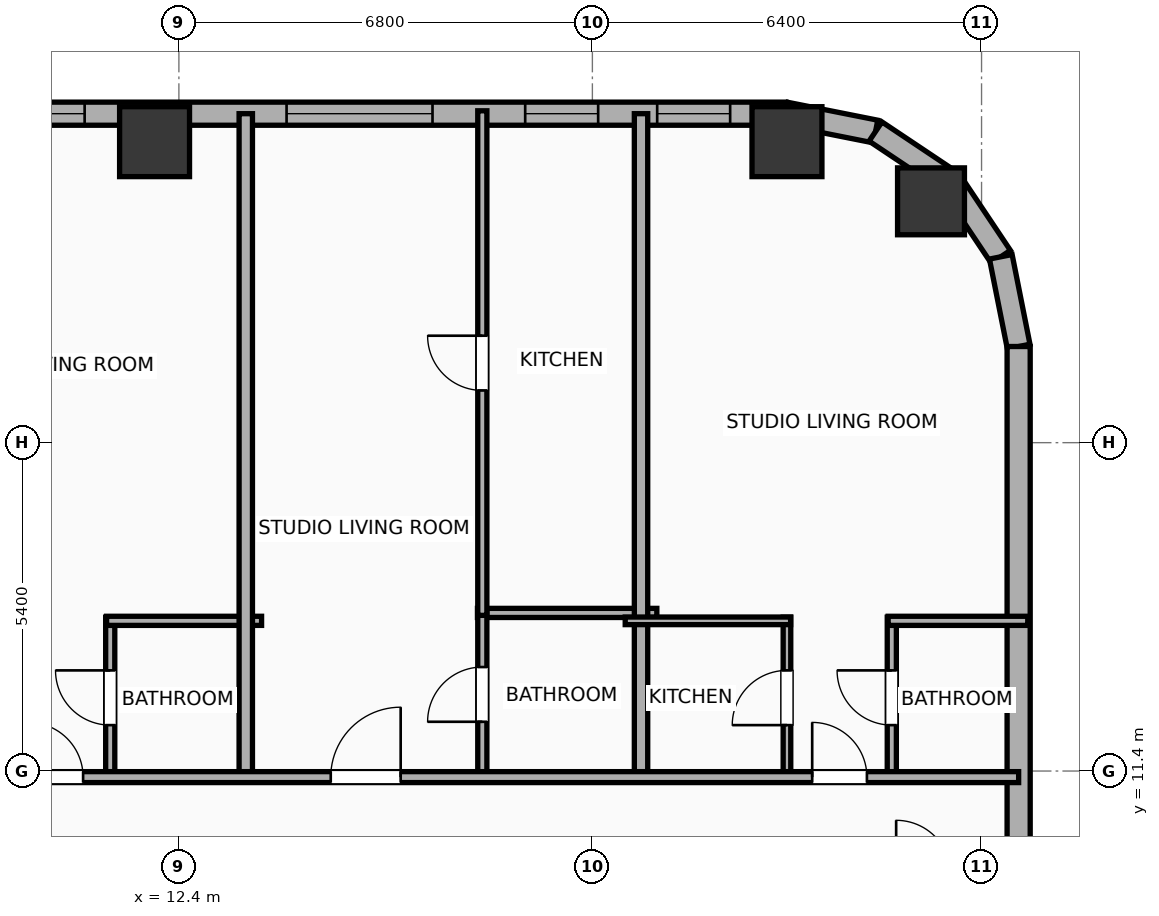
"""IFC4 building model, lengths in metres.
Left out: names, types, materials, properties, quantities, classifications, styles, units other than length and angle.
Written with IfcOpenShell. Run it as: python <this file> out.ifc"""

import sys

from ifc_helpers import new_model, si_unit, direction, frame, frame_2d, origin, origin_2d, place, context, subcontext, project, spatial, rectangle, hollow_rectangle, hollow_circle, extrude, element, fill, save


model = new_model("IFC4")
c1 = context("Model", 3, precision=1e-05, world=origin(), true_north=direction((0.0, 1.0)))
c2 = subcontext(c1, "Body", "Model", "MODEL_VIEW")
j1 = project(units=[si_unit("LENGTHUNIT", "METRE"), si_unit("PLANEANGLEUNIT", "RADIAN")], contexts=[c1])
p1 = place(None, origin())
s1 = spatial("IfcSite", under=j1, at=p1, CompositionType="ELEMENT")
p2 = place(p1, origin())
s2 = spatial("IfcBuilding", under=s1, at=p2, CompositionType="ELEMENT")
p3 = place(p2, frame((0.0, 0.0, 49.4)))
s3 = spatial("IfcBuildingStorey", under=s2, at=p3, CompositionType="ELEMENT", Elevation=49.4)
p4 = place(p3, frame((24.769, 20.769, 0.0), z_axis=(0.0, 0.0, 1.0), x_axis=(1.0, 0.0, 0.0)))
e1 = element("IfcColumn", 1, at=p4, inside=s3, PredefinedType="COLUMN", context=c2, shape_type="SweptSolid", body=[
    extrude(hollow_circle(Radius=0.55, WallThickness=0.036, at=origin_2d()), origin(), (0.0, 0.0, 1.0), 3.9),
])
for number, where, z_axis, x_axis in (
    (2, (22.4, 21.75, 0.0), (0.0, 0.0, 1.0), (1.0, 0.0, 0.0)),
    (3, (12.0, 21.75, 0.0), (0.0, 0.0, 1.0), (1.0, 0.0, 0.0)),
):
    element("IfcColumn", number, at=place(p3, frame(where, z_axis=z_axis, x_axis=x_axis)), inside=s3, PredefinedType="COLUMN", context=c2, shape_type="SweptSolid", body=[
        extrude(hollow_rectangle(XDim=1.15, YDim=1.15, WallThickness=0.04, at=origin_2d()), origin(), (0.0, 0.0, 1.0), 3.9),
    ])
p5 = place(p3, frame((-29.581, 22.21, 0.0), z_axis=(0.0, 0.0, 1.0), x_axis=(1.0, 0.0, 0.0)))
e4 = element("IfcWall", 4, at=p5, inside=s3, PredefinedType="ELEMENTEDWALL", context=c2, shape_type="SweptSolid", body=[
    extrude(rectangle(XDim=51.963, YDim=0.38, at=frame_2d((25.981, 0.0))), origin(), (0.0, 0.0, 1.0), 3.65),
])
p6 = place(p5, frame((6.61, 0.0, 0.75)))
e5 = element("IfcOpeningElement", 5, at=p6, cuts=e4, PredefinedType="OPENING", context=c2, shape_type="SweptSolid", body=[
    extrude(rectangle(XDim=2.4, YDim=2.1, at=frame_2d((1.2, 1.05))), frame((0.0, 0.2, 0.0), z_axis=(0.0, -1.0, 0.0), x_axis=(1.0, 0.0, 0.0)), (0.0, 0.0, 1.0), 0.4),
])
p7 = place(p5, frame((26.431, 0.0, 0.75)))
e6 = element("IfcOpeningElement", 6, at=p7, cuts=e4, PredefinedType="OPENING", context=c2, shape_type="SweptSolid", body=[
    extrude(rectangle(XDim=2.4, YDim=2.1, at=frame_2d((1.2, 1.05))), frame((0.0, 0.2, 0.0), z_axis=(0.0, -1.0, 0.0), x_axis=(1.0, 0.0, 0.0)), (0.0, 0.0, 1.0), 0.4),
])
p8 = place(p5, frame((43.752, 0.0, 0.75)))
e7 = element("IfcOpeningElement", 7, at=p8, cuts=e4, PredefinedType="OPENING", context=c2, shape_type="SweptSolid", body=[
    extrude(rectangle(XDim=2.4, YDim=2.1, at=frame_2d((1.2, 1.05))), frame((0.0, 0.2, 0.0), z_axis=(0.0, -1.0, 0.0), x_axis=(1.0, 0.0, 0.0)), (0.0, 0.0, 1.0), 0.4),
])
p9 = place(p5, frame((1.281, 0.0, 0.75)))
e8 = element("IfcOpeningElement", 8, at=p9, cuts=e4, PredefinedType="OPENING", context=c2, shape_type="SweptSolid", body=[
    extrude(rectangle(XDim=1.2, YDim=2.05, at=frame_2d((0.6, 1.025))), frame((0.0, 0.2, 0.0), z_axis=(0.0, -1.0, 0.0), x_axis=(1.0, 0.0, 0.0)), (0.0, 0.0, 1.0), 0.4),
])
p10 = place(p5, frame((3.922, 0.0, 0.75)))
e9 = element("IfcOpeningElement", 9, at=p10, cuts=e4, PredefinedType="OPENING", context=c2, shape_type="SweptSolid", body=[
    extrude(rectangle(XDim=1.2, YDim=2.05, at=frame_2d((0.6, 1.025))), frame((0.0, 0.2, 0.0), z_axis=(0.0, -1.0, 0.0), x_axis=(1.0, 0.0, 0.0)), (0.0, 0.0, 1.0), 0.4),
])
p11 = place(p5, frame((12.231, 0.0, 0.75)))
e10 = element("IfcOpeningElement", 10, at=p11, cuts=e4, PredefinedType="OPENING", context=c2, shape_type="SweptSolid", body=[
    extrude(rectangle(XDim=1.2, YDim=2.05, at=frame_2d((0.6, 1.025))), frame((0.0, 0.2, 0.0), z_axis=(0.0, -1.0, 0.0), x_axis=(1.0, 0.0, 0.0)), (0.0, 0.0, 1.0), 0.4),
])
p12 = place(p5, frame((18.805, 0.0, 0.75)))
e11 = element("IfcOpeningElement", 11, at=p12, cuts=e4, PredefinedType="OPENING", context=c2, shape_type="SweptSolid", body=[
    extrude(rectangle(XDim=1.2, YDim=2.05, at=frame_2d((0.6, 1.025))), frame((0.0, 0.2, 0.0), z_axis=(0.0, -1.0, 0.0), x_axis=(1.0, 0.0, 0.0)), (0.0, 0.0, 1.0), 0.4),
])
p13 = place(p5, frame((16.755, 0.0, 0.75)))
e12 = element("IfcOpeningElement", 12, at=p13, cuts=e4, PredefinedType="OPENING", context=c2, shape_type="SweptSolid", body=[
    extrude(rectangle(XDim=1.2, YDim=2.05, at=frame_2d((0.6, 1.025))), frame((0.0, 0.2, 0.0), z_axis=(0.0, -1.0, 0.0), x_axis=(1.0, 0.0, 0.0)), (0.0, 0.0, 1.0), 0.4),
])
p14 = place(p5, frame((23.776, 0.0, 0.75)))
e13 = element("IfcOpeningElement", 13, at=p14, cuts=e4, PredefinedType="OPENING", context=c2, shape_type="SweptSolid", body=[
    extrude(rectangle(XDim=1.2, YDim=2.05, at=frame_2d((0.6, 1.025))), frame((0.0, 0.2, 0.0), z_axis=(0.0, -1.0, 0.0), x_axis=(1.0, 0.0, 0.0)), (0.0, 0.0, 1.0), 0.4),
])
p15 = place(p5, frame((32.031, 0.0, 0.75)))
e14 = element("IfcOpeningElement", 14, at=p15, cuts=e4, PredefinedType="OPENING", context=c2, shape_type="SweptSolid", body=[
    extrude(rectangle(XDim=0.85, YDim=2.05, at=frame_2d((0.425, 1.025))), frame((0.0, 0.2, 0.0), z_axis=(0.0, -1.0, 0.0), x_axis=(1.0, 0.0, 0.0)), (0.0, 0.0, 1.0), 0.4),
])
p16 = place(p5, frame((34.276, 0.0, 0.75)))
e15 = element("IfcOpeningElement", 15, at=p16, cuts=e4, PredefinedType="OPENING", context=c2, shape_type="SweptSolid", body=[
    extrude(rectangle(XDim=1.2, YDim=2.05, at=frame_2d((0.6, 1.025))), frame((0.0, 0.2, 0.0), z_axis=(0.0, -1.0, 0.0), x_axis=(1.0, 0.0, 0.0)), (0.0, 0.0, 1.0), 0.4),
])
p17 = place(p5, frame((39.231, 0.0, 0.75)))
e16 = element("IfcOpeningElement", 16, at=p17, cuts=e4, PredefinedType="OPENING", context=c2, shape_type="SweptSolid", body=[
    extrude(rectangle(XDim=1.2, YDim=2.05, at=frame_2d((0.6, 1.025))), frame((0.0, 0.2, 0.0), z_axis=(0.0, -1.0, 0.0), x_axis=(1.0, 0.0, 0.0)), (0.0, 0.0, 1.0), 0.4),
])
p18 = place(p5, frame((47.676, 0.0, 0.75)))
e17 = element("IfcOpeningElement", 17, at=p18, cuts=e4, PredefinedType="OPENING", context=c2, shape_type="SweptSolid", body=[
    extrude(rectangle(XDim=1.2, YDim=2.05, at=frame_2d((0.6, 1.025))), frame((0.0, 0.2, 0.0), z_axis=(0.0, -1.0, 0.0), x_axis=(1.0, 0.0, 0.0)), (0.0, 0.0, 1.0), 0.4),
])
p19 = place(p5, frame((49.847, 0.0, 0.75)))
e18 = element("IfcOpeningElement", 18, at=p19, cuts=e4, PredefinedType="OPENING", context=c2, shape_type="SweptSolid", body=[
    extrude(rectangle(XDim=1.2, YDim=2.05, at=frame_2d((0.6, 1.025))), frame((0.0, 0.2, 0.0), z_axis=(0.0, -1.0, 0.0), x_axis=(1.0, 0.0, 0.0)), (0.0, 0.0, 1.0), 0.4),
])
p20 = place(p3, frame((22.381, 22.21, 0.0), z_axis=(0.0, 0.0, 1.0), x_axis=(0.980786132421, -0.195086038585, 0.0)))
e19 = element("IfcWall", 19, at=p20, inside=s3, PredefinedType="ELEMENTEDWALL", context=c2, shape_type="SweptSolid", body=[
    extrude(rectangle(XDim=1.504, YDim=0.38, at=frame_2d((0.752, 0.0))), origin(), (0.0, 0.0, 1.0), 3.65),
])
for number, where, z_axis, x_axis in (
    (20, (23.857, 21.917, 0.0), (0.0, 0.0, 1.0), (0.831, -0.556, 0.0)),
    (21, (25.091, 21.091, 0.0), (0.0, 0.0, 1.0), (0.556, -0.831, 0.0)),
):
    element("IfcWall", number, at=place(p3, frame(where, z_axis=z_axis, x_axis=x_axis)), inside=s3, PredefinedType="ELEMENTEDWALL", context=c2, shape_type="SweptSolid", body=[
        extrude(rectangle(XDim=1.485, YDim=0.38, at=frame_2d((0.743, 0.0))), origin(), (0.0, 0.0, 1.0), 3.65),
    ])
p21 = place(p3, frame((25.917, 19.857, 0.0), z_axis=(0.0, 0.0, 1.0), x_axis=(0.195086038585, -0.980786132421, 0.0)))
e22 = element("IfcWall", 22, at=p21, inside=s3, PredefinedType="ELEMENTEDWALL", context=c2, shape_type="SweptSolid", body=[
    extrude(rectangle(XDim=1.504, YDim=0.38, at=frame_2d((0.752, 0.0))), origin(), (0.0, 0.0, 1.0), 3.65),
])
p22 = place(p3, frame((26.21, 18.381, 0.0), z_axis=(0.0, 0.0, 1.0), x_axis=(0.0, -1.0, 0.0)))
e23 = element("IfcWall", 23, at=p22, inside=s3, PredefinedType="ELEMENTEDWALL", context=c2, shape_type="SweptSolid", body=[
    extrude(rectangle(XDim=36.763, YDim=0.38, at=frame_2d((18.381, 0.0))), origin(), (0.0, 0.0, 1.0), 3.65),
])
p23 = place(p3, frame((11.271, 11.28, 0.0), z_axis=(0.0, 0.0, 1.0), x_axis=(0.0, 1.0, 0.0)))
e24 = element("IfcWall", 24, at=p23, inside=s3, PredefinedType="PLUMBINGWALL", context=c2, shape_type="SweptSolid", body=[
    extrude(rectangle(XDim=2.65, YDim=0.15, at=frame_2d((1.325, 0.0))), origin(), (0.0, 0.0, 1.0), 3.65),
])
p24 = place(p23, frame((0.875, 0.0, 0.0)))
e25 = element("IfcOpeningElement", 25, at=p24, cuts=e24, PredefinedType="OPENING", context=c2, shape_type="SweptSolid", body=[
    extrude(rectangle(XDim=0.9, YDim=2.05, at=frame_2d((0.45, 1.025))), frame((0.0, 0.085, 0.0), z_axis=(0.0, -1.0, 0.0), x_axis=(1.0, 0.0, 0.0)), (0.0, 0.0, 1.0), 0.17),
])
p25 = place(p3, frame((11.211, 13.87, 0.0), z_axis=(0.0, 0.0, 1.0), x_axis=(1.0, 0.0, 0.0)))
e26 = element("IfcWall", 26, at=p25, inside=s3, PredefinedType="PLUMBINGWALL", context=c2, shape_type="SweptSolid", body=[
    extrude(rectangle(XDim=2.549, YDim=0.15, at=frame_2d((1.274, 0.0))), origin(), (0.0, 0.0, 1.0), 3.65),
])
p26 = place(p3, frame((13.5, 11.22, 0.0), z_axis=(0.0, 0.0, 1.0), x_axis=(0.0, 1.0, 0.0)))
e27 = element("IfcWall", 27, at=p26, inside=s3, PredefinedType="PARTITIONING", context=c2, shape_type="SweptSolid", body=[
    extrude(rectangle(XDim=10.99, YDim=0.22, at=frame_2d((5.495, 0.0))), origin(), (0.0, 0.0, 1.0), 3.65),
])
p27 = place(p3, frame((17.31, 14.0, 0.0), z_axis=(0.0, 0.0, 1.0), x_axis=(1.0, 0.0, 0.0)))
e28 = element("IfcWall", 28, at=p27, inside=s3, PredefinedType="PLUMBINGWALL", context=c2, shape_type="SweptSolid", body=[
    extrude(rectangle(XDim=2.95, YDim=0.15, at=frame_2d((1.475, 0.0))), origin(), (0.0, 0.0, 1.0), 3.65),
])
p28 = place(p3, frame((17.39, 11.28, 0.0), z_axis=(0.0, 0.0, 1.0), x_axis=(0.0, 1.0, 0.0)))
e29 = element("IfcWall", 29, at=p28, inside=s3, PredefinedType="PLUMBINGWALL", context=c2, shape_type="SweptSolid", body=[
    extrude(rectangle(XDim=2.76, YDim=0.15, at=frame_2d((1.38, 0.0))), origin(), (0.0, 0.0, 1.0), 3.65),
])
p29 = place(p28, frame((0.93, 0.0, 0.0)))
e30 = element("IfcOpeningElement", 30, at=p29, cuts=e29, PredefinedType="OPENING", context=c2, shape_type="SweptSolid", body=[
    extrude(rectangle(XDim=0.9, YDim=2.05, at=frame_2d((0.45, 1.025))), frame((0.0, 0.085, 0.0), z_axis=(0.0, -1.0, 0.0), x_axis=(1.0, 0.0, 0.0)), (0.0, 0.0, 1.0), 0.17),
])
p30 = place(p3, frame((17.39, 13.96, 0.0), z_axis=(0.0, 0.0, 1.0), x_axis=(0.0, 1.0, 0.0)))
e31 = element("IfcWall", 31, at=p30, inside=s3, PredefinedType="PLUMBINGWALL", context=c2, shape_type="SweptSolid", body=[
    extrude(rectangle(XDim=8.298, YDim=0.15, at=frame_2d((4.149, 0.0))), origin(), (0.0, 0.0, 1.0), 3.65),
])
p31 = place(p30, frame((3.699, 0.0, 0.0)))
e32 = element("IfcOpeningElement", 32, at=p31, cuts=e31, PredefinedType="OPENING", context=c2, shape_type="SweptSolid", body=[
    extrude(rectangle(XDim=0.9, YDim=2.05, at=frame_2d((0.45, 1.025))), frame((0.0, 0.085, 0.0), z_axis=(0.0, -1.0, 0.0), x_axis=(1.0, 0.0, 0.0)), (0.0, 0.0, 1.0), 0.17),
])
p32 = place(p3, frame((20.0, 11.22, 0.0), z_axis=(0.0, 0.0, 1.0), x_axis=(0.0, 1.0, 0.0)))
e33 = element("IfcWall", 33, at=p32, inside=s3, PredefinedType="PARTITIONING", context=c2, shape_type="SweptSolid", body=[
    extrude(rectangle(XDim=10.99, YDim=0.22, at=frame_2d((5.495, 0.0))), origin(), (0.0, 0.0, 1.0), 3.65),
])
p33 = place(p3, frame((22.4, 11.28, 0.0), z_axis=(0.0, 0.0, 1.0), x_axis=(0.0, 1.0, 0.0)))
e34 = element("IfcWall", 34, at=p33, inside=s3, PredefinedType="PARTITIONING", context=c2, shape_type="SweptSolid", body=[
    extrude(rectangle(XDim=2.65, YDim=0.125, at=frame_2d((1.325, 0.0))), origin(), (0.0, 0.0, 1.0), 3.65),
])
p34 = place(p33, frame((0.875, 0.0, 0.0)))
e35 = element("IfcOpeningElement", 35, at=p34, cuts=e34, PredefinedType="OPENING", context=c2, shape_type="SweptSolid", body=[
    extrude(rectangle(XDim=0.9, YDim=2.05, at=frame_2d((0.45, 1.025))), frame((0.0, 0.073, 0.0), z_axis=(0.0, -1.0, 0.0), x_axis=(1.0, 0.0, 0.0)), (0.0, 0.0, 1.0), 0.145),
])
p35 = place(p3, frame((24.124, 11.28, 0.0), z_axis=(0.0, 0.0, 1.0), x_axis=(0.0, 1.0, 0.0)))
e36 = element("IfcWall", 36, at=p35, inside=s3, PredefinedType="PLUMBINGWALL", context=c2, shape_type="SweptSolid", body=[
    extrude(rectangle(XDim=2.65, YDim=0.15, at=frame_2d((1.325, 0.0))), origin(), (0.0, 0.0, 1.0), 3.65),
])
p36 = place(p35, frame((0.875, 0.0, 0.0)))
e37 = element("IfcOpeningElement", 37, at=p36, cuts=e36, PredefinedType="OPENING", context=c2, shape_type="SweptSolid", body=[
    extrude(rectangle(XDim=0.9, YDim=2.05, at=frame_2d((0.45, 1.025))), frame((0.0, 0.085, 0.0), z_axis=(0.0, -1.0, 0.0), x_axis=(1.0, 0.0, 0.0)), (0.0, 0.0, 1.0), 0.17),
])
p37 = place(p3, frame((19.74, 13.87, 0.0), z_axis=(0.0, 0.0, 1.0), x_axis=(1.0, 0.0, 0.0)))
e38 = element("IfcWall", 38, at=p37, inside=s3, PredefinedType="PARTITIONING", context=c2, shape_type="SweptSolid", body=[
    extrude(rectangle(XDim=2.72, YDim=0.125, at=frame_2d((1.36, 0.0))), origin(), (0.0, 0.0, 1.0), 3.65),
])
p38 = place(p3, frame((24.064, 13.87, 0.0), z_axis=(0.0, 0.0, 1.0), x_axis=(1.0, 0.0, 0.0)))
e39 = element("IfcWall", 39, at=p38, inside=s3, PredefinedType="PLUMBINGWALL", context=c2, shape_type="SweptSolid", body=[
    extrude(rectangle(XDim=2.296, YDim=0.15, at=frame_2d((1.148, 0.0))), origin(), (0.0, 0.0, 1.0), 3.65),
])
p39 = place(p3, frame((-33.41, 11.3, 0.0), z_axis=(0.0, 0.0, 1.0), x_axis=(1.0, 0.0, 0.0)))
e40 = element("IfcWall", 40, at=p39, inside=s3, PredefinedType="PARTITIONING", context=c2, shape_type="SweptSolid", body=[
    extrude(rectangle(XDim=59.62, YDim=0.18, at=frame_2d((29.81, 0.0))), origin(), (0.0, 0.0, 1.0), 3.65),
])
p40 = place(p39, frame((3.032, 0.0, 0.0)))
e41 = element("IfcOpeningElement", 41, at=p40, cuts=e40, PredefinedType="OPENING", context=c2, shape_type="SweptSolid", body=[
    extrude(rectangle(XDim=0.9, YDim=2.05, at=frame_2d((0.45, 1.025))), frame((0.0, 0.1, 0.0), z_axis=(0.0, -1.0, 0.0), x_axis=(1.0, 0.0, 0.0)), (0.0, 0.0, 1.0), 0.2),
])
p41 = place(p39, frame((9.769, 0.0, 0.0)))
e42 = element("IfcOpeningElement", 42, at=p41, cuts=e40, PredefinedType="OPENING", context=c2, shape_type="SweptSolid", body=[
    extrude(rectangle(XDim=0.9, YDim=2.05, at=frame_2d((0.45, 1.025))), frame((0.0, 0.1, 0.0), z_axis=(0.0, -1.0, 0.0), x_axis=(1.0, 0.0, 0.0)), (0.0, 0.0, 1.0), 0.2),
])
p42 = place(p39, frame((16.339, 0.0, 0.0)))
e43 = element("IfcOpeningElement", 43, at=p42, cuts=e40, PredefinedType="OPENING", context=c2, shape_type="SweptSolid", body=[
    extrude(rectangle(XDim=0.9, YDim=2.05, at=frame_2d((0.45, 1.025))), frame((0.0, 0.1, 0.0), z_axis=(0.0, -1.0, 0.0), x_axis=(1.0, 0.0, 0.0)), (0.0, 0.0, 1.0), 0.2),
])
p43 = place(p39, frame((23.827, 0.0, 0.0)))
e44 = element("IfcOpeningElement", 44, at=p43, cuts=e40, PredefinedType="OPENING", context=c2, shape_type="SweptSolid", body=[
    extrude(rectangle(XDim=1.15, YDim=2.05, at=frame_2d((0.575, 1.025))), frame((0.0, 0.1, 0.0), z_axis=(0.0, -1.0, 0.0), x_axis=(1.0, 0.0, 0.0)), (0.0, 0.0, 1.0), 0.2),
])
p44 = place(p39, frame((29.622, 0.0, 0.0)))
e45 = element("IfcOpeningElement", 45, at=p44, cuts=e40, PredefinedType="OPENING", context=c2, shape_type="SweptSolid", body=[
    extrude(rectangle(XDim=0.9, YDim=2.05, at=frame_2d((0.45, 1.025))), frame((0.0, 0.1, 0.0), z_axis=(0.0, -1.0, 0.0), x_axis=(1.0, 0.0, 0.0)), (0.0, 0.0, 1.0), 0.2),
])
p45 = place(p39, frame((36.628, 0.0, 0.0)))
e46 = element("IfcOpeningElement", 46, at=p45, cuts=e40, PredefinedType="OPENING", context=c2, shape_type="SweptSolid", body=[
    extrude(rectangle(XDim=0.9, YDim=2.05, at=frame_2d((0.45, 1.025))), frame((0.0, 0.1, 0.0), z_axis=(0.0, -1.0, 0.0), x_axis=(1.0, 0.0, 0.0)), (0.0, 0.0, 1.0), 0.2),
])
p46 = place(p39, frame((43.335, 0.0, 0.0)))
e47 = element("IfcOpeningElement", 47, at=p46, cuts=e40, PredefinedType="OPENING", context=c2, shape_type="SweptSolid", body=[
    extrude(rectangle(XDim=0.9, YDim=2.05, at=frame_2d((0.45, 1.025))), frame((0.0, 0.1, 0.0), z_axis=(0.0, -1.0, 0.0), x_axis=(1.0, 0.0, 0.0)), (0.0, 0.0, 1.0), 0.2),
])
p47 = place(p39, frame((48.307, 0.0, 0.0)))
e48 = element("IfcOpeningElement", 48, at=p47, cuts=e40, PredefinedType="OPENING", context=c2, shape_type="SweptSolid", body=[
    extrude(rectangle(XDim=1.15, YDim=2.05, at=frame_2d((0.575, 1.025))), frame((0.0, 0.1, 0.0), z_axis=(0.0, -1.0, 0.0), x_axis=(1.0, 0.0, 0.0)), (0.0, 0.0, 1.0), 0.2),
])
p48 = place(p39, frame((56.225, 0.0, 0.0)))
e49 = element("IfcOpeningElement", 49, at=p48, cuts=e40, PredefinedType="OPENING", context=c2, shape_type="SweptSolid", body=[
    extrude(rectangle(XDim=0.9, YDim=2.05, at=frame_2d((0.45, 1.025))), frame((0.0, 0.1, 0.0), z_axis=(0.0, -1.0, 0.0), x_axis=(1.0, 0.0, 0.0)), (0.0, 0.0, 1.0), 0.2),
])
p49 = place(p8, origin())
e50 = element("IfcWindow", 50, at=p49, inside=s3, PartitioningType="SINGLE_PANEL", PredefinedType="WINDOW", context=c2, shape_type="SweptSolid", body=[
    extrude(rectangle(XDim=2.4, YDim=2.1, at=frame_2d((1.2, 1.05))), frame((0.0, 0.03, 0.0), z_axis=(0.0, -1.0, 0.0), x_axis=(1.0, 0.0, 0.0)), (0.0, 0.0, 1.0), 0.06),
])
fill(e7, e50)
p50 = place(p17, origin())
e51 = element("IfcWindow", 51, at=p50, inside=s3, PartitioningType="SINGLE_PANEL", PredefinedType="WINDOW", context=c2, shape_type="SweptSolid", body=[
    extrude(rectangle(XDim=1.2, YDim=2.05, at=frame_2d((0.6, 1.025))), frame((0.0, 0.03, 0.0), z_axis=(0.0, -1.0, 0.0), x_axis=(1.0, 0.0, 0.0)), (0.0, 0.0, 1.0), 0.06),
])
fill(e16, e51)
p51 = place(p18, origin())
e52 = element("IfcWindow", 52, at=p51, inside=s3, PartitioningType="SINGLE_PANEL", PredefinedType="WINDOW", context=c2, shape_type="SweptSolid", body=[
    extrude(rectangle(XDim=1.2, YDim=2.05, at=frame_2d((0.6, 1.025))), frame((0.0, 0.03, 0.0), z_axis=(0.0, -1.0, 0.0), x_axis=(1.0, 0.0, 0.0)), (0.0, 0.0, 1.0), 0.06),
])
fill(e17, e52)
p52 = place(p19, origin())
e53 = element("IfcWindow", 53, at=p52, inside=s3, PartitioningType="SINGLE_PANEL", PredefinedType="WINDOW", context=c2, shape_type="SweptSolid", body=[
    extrude(rectangle(XDim=1.2, YDim=2.05, at=frame_2d((0.6, 1.025))), frame((0.0, 0.03, 0.0), z_axis=(0.0, -1.0, 0.0), x_axis=(1.0, 0.0, 0.0)), (0.0, 0.0, 1.0), 0.06),
])
fill(e18, e53)
p53 = place(p24, origin())
e54 = element("IfcDoor", 54, at=p53, inside=s3, OperationType="SINGLE_SWING_RIGHT", PredefinedType="DOOR", context=c2, shape_type="SweptSolid", body=[
    extrude(rectangle(XDim=0.9, YDim=2.05, at=frame_2d((0.45, 1.025))), frame((0.0, 0.025, 0.0), z_axis=(0.0, -1.0, 0.0), x_axis=(1.0, 0.0, 0.0)), (0.0, 0.0, 1.0), 0.05),
])
fill(e25, e54)
p54 = place(p29, origin())
e55 = element("IfcDoor", 55, at=p54, inside=s3, OperationType="SINGLE_SWING_LEFT", PredefinedType="DOOR", context=c2, shape_type="SweptSolid", body=[
    extrude(rectangle(XDim=0.9, YDim=2.05, at=frame_2d((0.45, 1.025))), frame((0.0, 0.025, 0.0), z_axis=(0.0, -1.0, 0.0), x_axis=(1.0, 0.0, 0.0)), (0.0, 0.0, 1.0), 0.05),
])
fill(e30, e55)
p55 = place(p31, origin())
e56 = element("IfcDoor", 56, at=p55, inside=s3, OperationType="SINGLE_SWING_RIGHT", PredefinedType="DOOR", context=c2, shape_type="SweptSolid", body=[
    extrude(rectangle(XDim=0.9, YDim=2.05, at=frame_2d((0.45, 1.025))), frame((0.0, 0.025, 0.0), z_axis=(0.0, -1.0, 0.0), x_axis=(1.0, 0.0, 0.0)), (0.0, 0.0, 1.0), 0.05),
])
fill(e32, e56)
p56 = place(p34, origin())
e57 = element("IfcDoor", 57, at=p56, inside=s3, OperationType="SINGLE_SWING_LEFT", PredefinedType="DOOR", context=c2, shape_type="SweptSolid", body=[
    extrude(rectangle(XDim=0.9, YDim=2.05, at=frame_2d((0.45, 1.025))), frame((0.0, 0.025, 0.0), z_axis=(0.0, -1.0, 0.0), x_axis=(1.0, 0.0, 0.0)), (0.0, 0.0, 1.0), 0.05),
])
fill(e35, e57)
p57 = place(p36, origin())
e58 = element("IfcDoor", 58, at=p57, inside=s3, OperationType="SINGLE_SWING_RIGHT", PredefinedType="DOOR", context=c2, shape_type="SweptSolid", body=[
    extrude(rectangle(XDim=0.9, YDim=2.05, at=frame_2d((0.45, 1.025))), frame((0.0, 0.025, 0.0), z_axis=(0.0, -1.0, 0.0), x_axis=(1.0, 0.0, 0.0)), (0.0, 0.0, 1.0), 0.05),
])
fill(e37, e58)
p58 = place(p46, origin())
e59 = element("IfcDoor", 59, at=p58, inside=s3, OperationType="SINGLE_SWING_LEFT", PredefinedType="DOOR", context=c2, shape_type="SweptSolid", body=[
    extrude(rectangle(XDim=0.9, YDim=2.05, at=frame_2d((0.45, 1.025))), frame((0.0, 0.025, 0.0), z_axis=(0.0, -1.0, 0.0), x_axis=(1.0, 0.0, 0.0)), (0.0, 0.0, 1.0), 0.05),
])
fill(e47, e59)
p59 = place(p47, origin())
e60 = element("IfcDoor", 60, at=p59, inside=s3, OperationType="SINGLE_SWING_RIGHT", PredefinedType="DOOR", context=c2, shape_type="SweptSolid", body=[
    extrude(rectangle(XDim=1.15, YDim=2.05, at=frame_2d((0.575, 1.025))), frame((0.0, 0.025, 0.0), z_axis=(0.0, -1.0, 0.0), x_axis=(1.0, 0.0, 0.0)), (0.0, 0.0, 1.0), 0.05),
])
fill(e48, e60)
p60 = place(p48, origin())
e61 = element("IfcDoor", 61, at=p60, inside=s3, OperationType="SINGLE_SWING_LEFT", PredefinedType="DOOR", context=c2, shape_type="SweptSolid", body=[
    extrude(rectangle(XDim=0.9, YDim=2.05, at=frame_2d((0.45, 1.025))), frame((0.0, 0.025, 0.0), z_axis=(0.0, -1.0, 0.0), x_axis=(1.0, 0.0, 0.0)), (0.0, 0.0, 1.0), 0.05),
])
fill(e49, e61)
save(model, sys.argv[1])
